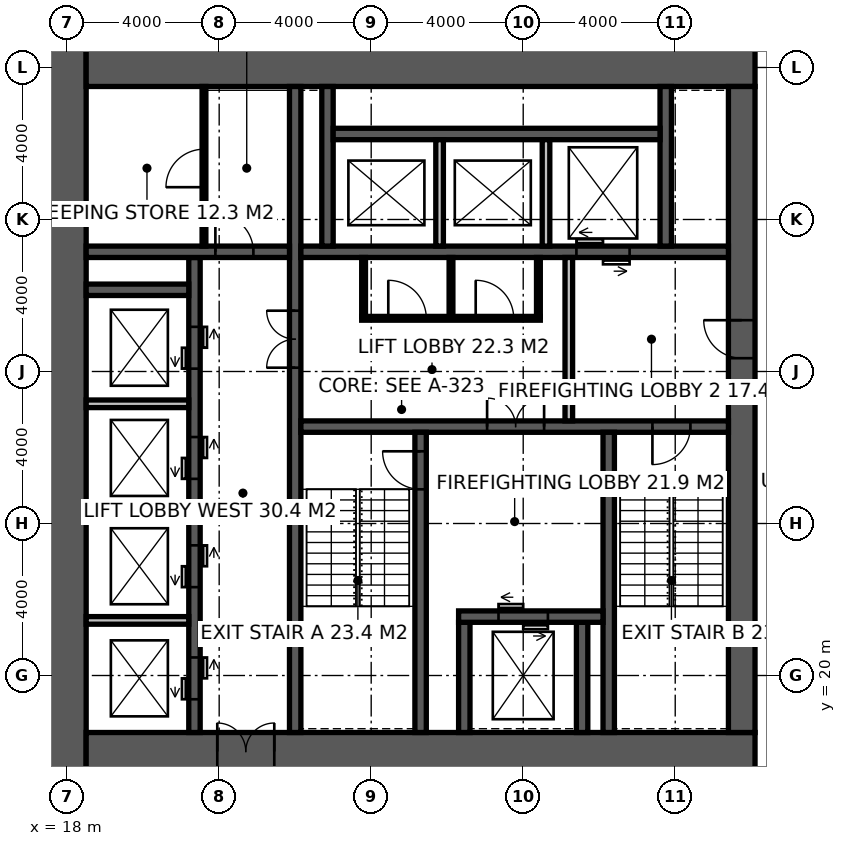
"""IFC4 building model, lengths in metres.
Left out: names, types, materials, properties, quantities, classifications, styles, units other than length and angle.
Written with IfcOpenShell. Run it as: python <this file> out.ifc"""

import sys

from ifc_helpers import new_model, si_unit, direction, frame, frame_2d, origin, place, context, subcontext, project, spatial, rectangle, extrude, element, fill, save


model = new_model("IFC4")
c1 = context("Model", 3, precision=1e-05, world=origin(), true_north=direction((0.0, 1.0)))
c2 = subcontext(c1, "Body", "Model", "MODEL_VIEW")
j1 = project(units=[si_unit("LENGTHUNIT", "METRE"), si_unit("PLANEANGLEUNIT", "RADIAN")], contexts=[c1])
p1 = place(None, origin())
s1 = spatial("IfcSite", under=j1, at=p1, CompositionType="ELEMENT")
p2 = place(p1, origin())
s2 = spatial("IfcBuilding", under=s1, at=p2, CompositionType="ELEMENT")
p3 = place(p2, frame((0.0, 0.0, 113.4)))
s3 = spatial("IfcBuildingStorey", under=s2, at=p3, CompositionType="ELEMENT", Elevation=113.4)
p4 = place(p3, frame((18.0, 17.5, -0.15), z_axis=(0.0, 0.0, 1.0), x_axis=(0.0, 1.0, 0.0)))
e1 = element("IfcWall", 1, at=p4, inside=s3, PredefinedType="SHEAR", context=c2, shape_type="SweptSolid", body=[
    extrude(rectangle(XDim=19.0, YDim=1.0, at=frame_2d((9.5, 0.0))), origin(), (0.0, 0.0, 1.0), 4.0),
])
p5 = place(p3, frame((18.5, 18.0, -0.15), z_axis=(0.0, 0.0, 1.0), x_axis=(1.0, 0.0, 0.0)))
e2 = element("IfcWall", 2, at=p5, inside=s3, PredefinedType="SHEAR", context=c2, shape_type="SweptSolid", body=[
    extrude(rectangle(XDim=17.6, YDim=1.0, at=frame_2d((8.8, 0.0))), origin(), (0.0, 0.0, 1.0), 4.0),
])
p6 = place(p5, frame((3.45, 0.0, 0.15)))
e3 = element("IfcOpeningElement", 3, at=p6, cuts=e2, PredefinedType="OPENING", context=c2, shape_type="SweptSolid", body=[
    extrude(rectangle(XDim=1.5, YDim=2.4, at=frame_2d((0.75, 1.2))), frame((0.0, 0.51, 0.0), z_axis=(0.0, -1.0, 0.0), x_axis=(1.0, 0.0, 0.0)), (0.0, 0.0, 1.0), 1.02),
])
p7 = place(p3, frame((18.5, 36.0, -0.15), z_axis=(0.0, 0.0, 1.0), x_axis=(1.0, 0.0, 0.0)))
e4 = element("IfcWall", 4, at=p7, inside=s3, PredefinedType="SHEAR", context=c2, shape_type="SweptSolid", body=[
    extrude(rectangle(XDim=17.6, YDim=1.0, at=frame_2d((8.8, 0.0))), origin(), (0.0, 0.0, 1.0), 4.0),
])
p8 = place(p3, frame((35.75, 18.5, -0.15), z_axis=(0.0, 0.0, 1.0), x_axis=(0.0, 1.0, 0.0)))
e5 = element("IfcWall", 5, at=p8, inside=s3, PredefinedType="SHEAR", context=c2, shape_type="SweptSolid", body=[
    extrude(rectangle(XDim=17.0, YDim=0.7, at=frame_2d((8.5, 0.0))), origin(), (0.0, 0.0, 1.0), 4.0),
])
p9 = place(p8, frame((9.85, 0.0, 0.15)))
e6 = element("IfcOpeningElement", 6, at=p9, cuts=e5, PredefinedType="OPENING", context=c2, shape_type="SweptSolid", body=[
    extrude(rectangle(XDim=1.0, YDim=2.2, at=frame_2d((0.5, 1.1))), frame((0.0, 0.36, 0.0), z_axis=(0.0, -1.0, 0.0), x_axis=(1.0, 0.0, 0.0)), (0.0, 0.0, 1.0), 0.72),
])
p10 = place(p3, frame((24.0, 18.5, -0.15), z_axis=(0.0, 0.0, 1.0), x_axis=(0.0, 1.0, 0.0)))
e7 = element("IfcWall", 7, at=p10, inside=s3, PredefinedType="SHEAR", context=c2, shape_type="SweptSolid", body=[
    extrude(rectangle(XDim=17.0, YDim=0.3, at=frame_2d((8.5, 0.0))), origin(), (0.0, 0.0, 1.0), 4.0),
])
p11 = place(p10, frame((9.6, 0.0, 0.15)))
e8 = element("IfcOpeningElement", 8, at=p11, cuts=e7, PredefinedType="OPENING", context=c2, shape_type="SweptSolid", body=[
    extrude(rectangle(XDim=1.5, YDim=2.4, at=frame_2d((0.75, 1.2))), frame((0.0, 0.16, 0.0), z_axis=(0.0, -1.0, 0.0), x_axis=(1.0, 0.0, 0.0)), (0.0, 0.0, 1.0), 0.32),
])
p12 = place(p3, frame((24.15, 26.55, -0.15), z_axis=(0.0, 0.0, 1.0), x_axis=(1.0, 0.0, 0.0)))
e9 = element("IfcWall", 9, at=p12, inside=s3, PredefinedType="SHEAR", context=c2, shape_type="SweptSolid", body=[
    extrude(rectangle(XDim=11.25, YDim=0.3, at=frame_2d((5.625, 0.0))), origin(), (0.0, 0.0, 1.0), 4.0),
])
p13 = place(p12, frame((9.25, 0.0, 0.15)))
e10 = element("IfcOpeningElement", 10, at=p13, cuts=e9, PredefinedType="OPENING", context=c2, shape_type="SweptSolid", body=[
    extrude(rectangle(XDim=1.0, YDim=2.2, at=frame_2d((0.5, 1.1))), frame((0.0, 0.16, 0.0), z_axis=(0.0, -1.0, 0.0), x_axis=(1.0, 0.0, 0.0)), (0.0, 0.0, 1.0), 0.32),
])
p14 = place(p12, frame((4.9, 0.0, 0.15)))
e11 = element("IfcOpeningElement", 11, at=p14, cuts=e9, PredefinedType="OPENING", context=c2, shape_type="SweptSolid", body=[
    extrude(rectangle(XDim=1.5, YDim=2.4, at=frame_2d((0.75, 1.2))), frame((0.0, 0.16, 0.0), z_axis=(0.0, -1.0, 0.0), x_axis=(1.0, 0.0, 0.0)), (0.0, 0.0, 1.0), 0.32),
])
p15 = place(p3, frame((27.3, 18.5, -0.15), z_axis=(0.0, 0.0, 1.0), x_axis=(0.0, 1.0, 0.0)))
e12 = element("IfcWall", 12, at=p15, inside=s3, PredefinedType="SHEAR", context=c2, shape_type="SweptSolid", body=[
    extrude(rectangle(XDim=7.9, YDim=0.3, at=frame_2d((3.95, 0.0))), origin(), (0.0, 0.0, 1.0), 4.0),
])
p16 = place(p15, frame((6.4, 0.0, 0.15)))
e13 = element("IfcOpeningElement", 13, at=p16, cuts=e12, PredefinedType="OPENING", context=c2, shape_type="SweptSolid", body=[
    extrude(rectangle(XDim=1.0, YDim=2.2, at=frame_2d((0.5, 1.1))), frame((0.0, 0.16, 0.0), z_axis=(0.0, -1.0, 0.0), x_axis=(1.0, 0.0, 0.0)), (0.0, 0.0, 1.0), 0.32),
])
p17 = place(p3, frame((32.25, 18.5, -0.15), z_axis=(0.0, 0.0, 1.0), x_axis=(0.0, 1.0, 0.0)))
e14 = element("IfcWall", 14, at=p17, inside=s3, PredefinedType="SHEAR", context=c2, shape_type="SweptSolid", body=[
    extrude(rectangle(XDim=7.9, YDim=0.3, at=frame_2d((3.95, 0.0))), origin(), (0.0, 0.0, 1.0), 4.0),
])
for number, where, z_axis, x_axis in (
    (15, (28.45, 18.5, -0.15), (0.0, 0.0, 1.0), (0.0, 1.0, 0.0)),
    (16, (31.55, 18.5, -0.15), (0.0, 0.0, 1.0), (0.0, 1.0, 0.0)),
):
    element("IfcWall", number, at=place(p3, frame(where, z_axis=z_axis, x_axis=x_axis)), inside=s3, PredefinedType="SHEAR", context=c2, shape_type="SweptSolid", body=[
        extrude(rectangle(XDim=2.9, YDim=0.3, at=frame_2d((1.45, 0.0))), origin(), (0.0, 0.0, 1.0), 4.0),
    ])
p18 = place(p3, frame((28.3, 21.55, -0.15), z_axis=(0.0, 0.0, 1.0), x_axis=(1.0, 0.0, 0.0)))
e17 = element("IfcWall", 17, at=p18, inside=s3, PredefinedType="SHEAR", context=c2, shape_type="SweptSolid", body=[
    extrude(rectangle(XDim=3.8, YDim=0.3, at=frame_2d((1.9, 0.0))), origin(), (0.0, 0.0, 1.0), 4.0),
])
p19 = place(p18, frame((1.05, 0.0, 0.15)))
e18 = element("IfcOpeningElement", 18, at=p19, cuts=e17, PredefinedType="OPENING", context=c2, shape_type="SweptSolid", body=[
    extrude(rectangle(XDim=1.3, YDim=2.4, at=frame_2d((0.65, 1.2))), frame((0.0, 0.16, 0.0), z_axis=(0.0, -1.0, 0.0), x_axis=(1.0, 0.0, 0.0)), (0.0, 0.0, 1.0), 0.32),
])
p20 = place(p3, frame((24.15, 31.15, -0.15), z_axis=(0.0, 0.0, 1.0), x_axis=(1.0, 0.0, 0.0)))
e19 = element("IfcWall", 19, at=p20, inside=s3, PredefinedType="SHEAR", context=c2, shape_type="SweptSolid", body=[
    extrude(rectangle(XDim=11.25, YDim=0.3, at=frame_2d((5.625, 0.0))), origin(), (0.0, 0.0, 1.0), 4.0),
])
p21 = place(p20, frame((7.25, 0.0, 0.15)))
e20 = element("IfcOpeningElement", 20, at=p21, cuts=e19, PredefinedType="OPENING", context=c2, shape_type="SweptSolid", body=[
    extrude(rectangle(XDim=1.4, YDim=2.4, at=frame_2d((0.7, 1.2))), frame((0.0, 0.16, 0.0), z_axis=(0.0, -1.0, 0.0), x_axis=(1.0, 0.0, 0.0)), (0.0, 0.0, 1.0), 0.32),
])
p22 = place(p3, frame((21.35, 18.5, -0.15), z_axis=(0.0, 0.0, 1.0), x_axis=(0.0, 1.0, 0.0)))
e21 = element("IfcWall", 21, at=p22, inside=s3, PredefinedType="SHEAR", context=c2, shape_type="SweptSolid", body=[
    extrude(rectangle(XDim=12.5, YDim=0.3, at=frame_2d((6.25, 0.0))), origin(), (0.0, 0.0, 1.0), 4.0),
])
p23 = place(p22, frame((0.875, 0.0, 0.15)))
e22 = element("IfcOpeningElement", 22, at=p23, cuts=e21, PredefinedType="OPENING", context=c2, shape_type="SweptSolid", body=[
    extrude(rectangle(XDim=1.1, YDim=2.2, at=frame_2d((0.55, 1.1))), frame((0.0, 0.16, 0.0), z_axis=(0.0, -1.0, 0.0), x_axis=(1.0, 0.0, 0.0)), (0.0, 0.0, 1.0), 0.32),
])
p24 = place(p22, frame((3.825, 0.0, 0.15)))
e23 = element("IfcOpeningElement", 23, at=p24, cuts=e21, PredefinedType="OPENING", context=c2, shape_type="SweptSolid", body=[
    extrude(rectangle(XDim=1.1, YDim=2.2, at=frame_2d((0.55, 1.1))), frame((0.0, 0.16, 0.0), z_axis=(0.0, -1.0, 0.0), x_axis=(1.0, 0.0, 0.0)), (0.0, 0.0, 1.0), 0.32),
])
p25 = place(p22, frame((6.675, 0.0, 0.15)))
e24 = element("IfcOpeningElement", 24, at=p25, cuts=e21, PredefinedType="OPENING", context=c2, shape_type="SweptSolid", body=[
    extrude(rectangle(XDim=1.1, YDim=2.2, at=frame_2d((0.55, 1.1))), frame((0.0, 0.16, 0.0), z_axis=(0.0, -1.0, 0.0), x_axis=(1.0, 0.0, 0.0)), (0.0, 0.0, 1.0), 0.32),
])
p26 = place(p22, frame((9.575, 0.0, 0.15)))
e25 = element("IfcOpeningElement", 25, at=p26, cuts=e21, PredefinedType="OPENING", context=c2, shape_type="SweptSolid", body=[
    extrude(rectangle(XDim=1.1, YDim=2.2, at=frame_2d((0.55, 1.1))), frame((0.0, 0.16, 0.0), z_axis=(0.0, -1.0, 0.0), x_axis=(1.0, 0.0, 0.0)), (0.0, 0.0, 1.0), 0.32),
])
p27 = place(p3, frame((18.5, 31.15, -0.15), z_axis=(0.0, 0.0, 1.0), x_axis=(1.0, 0.0, 0.0)))
e26 = element("IfcWall", 26, at=p27, inside=s3, PredefinedType="SHEAR", context=c2, shape_type="SweptSolid", body=[
    extrude(rectangle(XDim=5.35, YDim=0.3, at=frame_2d((2.675, 0.0))), origin(), (0.0, 0.0, 1.0), 4.0),
])
p28 = place(p27, frame((3.4, 0.0, 0.15)))
e27 = element("IfcOpeningElement", 27, at=p28, cuts=e26, PredefinedType="OPENING", context=c2, shape_type="SweptSolid", body=[
    extrude(rectangle(XDim=1.0, YDim=2.2, at=frame_2d((0.5, 1.1))), frame((0.0, 0.16, 0.0), z_axis=(0.0, -1.0, 0.0), x_axis=(1.0, 0.0, 0.0)), (0.0, 0.0, 1.0), 0.32),
])
p29 = place(p3, frame((18.5, 30.15, -0.15), z_axis=(0.0, 0.0, 1.0), x_axis=(1.0, 0.0, 0.0)))
e28 = element("IfcWall", 28, at=p29, inside=s3, PredefinedType="SHEAR", context=c2, shape_type="SweptSolid", body=[
    extrude(rectangle(XDim=2.7, YDim=0.3, at=frame_2d((1.35, 0.0))), origin(), (0.0, 0.0, 1.0), 4.0),
])
for number, where, z_axis, x_axis in (
    (29, (24.85, 31.3, -0.15), (0.0, 0.0, 1.0), (0.0, 1.0, 0.0)),
    (30, (33.75, 31.3, -0.15), (0.0, 0.0, 1.0), (0.0, 1.0, 0.0)),
):
    element("IfcWall", number, at=place(p3, frame(where, z_axis=z_axis, x_axis=x_axis)), inside=s3, PredefinedType="SHEAR", context=c2, shape_type="SweptSolid", body=[
        extrude(rectangle(XDim=4.2, YDim=0.3, at=frame_2d((2.1, 0.0))), origin(), (0.0, 0.0, 1.0), 4.0),
    ])
p30 = place(p3, frame((25.0, 34.25, -0.15), z_axis=(0.0, 0.0, 1.0), x_axis=(1.0, 0.0, 0.0)))
e31 = element("IfcWall", 31, at=p30, inside=s3, PredefinedType="SHEAR", context=c2, shape_type="SweptSolid", body=[
    extrude(rectangle(XDim=8.6, YDim=0.3, at=frame_2d((4.3, 0.0))), origin(), (0.0, 0.0, 1.0), 4.0),
])
for number, where, z_axis, x_axis in (
    (32, (27.8, 31.3, -0.15), (0.0, 0.0, 1.0), (0.0, 1.0, 0.0)),
    (33, (30.6, 31.3, -0.15), (0.0, 0.0, 1.0), (0.0, 1.0, 0.0)),
):
    element("IfcWall", number, at=place(p3, frame(where, z_axis=z_axis, x_axis=x_axis)), inside=s3, PredefinedType="SOLIDWALL", context=c2, shape_type="SweptSolid", body=[
        extrude(rectangle(XDim=2.8, YDim=0.2, at=frame_2d((1.4, 0.0))), origin(), (0.0, 0.0, 1.0), 4.0),
    ])
for number, where, z_axis, x_axis in (
    (34, (18.5, 21.45, -0.15), (0.0, 0.0, 1.0), (1.0, 0.0, 0.0)),
    (35, (18.5, 24.3, -0.15), (0.0, 0.0, 1.0), (1.0, 0.0, 0.0)),
    (36, (18.5, 27.15, -0.15), (0.0, 0.0, 1.0), (1.0, 0.0, 0.0)),
):
    element("IfcWall", number, at=place(p3, frame(where, z_axis=z_axis, x_axis=x_axis)), inside=s3, PredefinedType="SOLIDWALL", context=c2, shape_type="SweptSolid", body=[
        extrude(rectangle(XDim=2.7, YDim=0.2, at=frame_2d((1.35, 0.0))), origin(), (0.0, 0.0, 1.0), 4.0),
    ])
p31 = place(p3, frame((31.2, 26.7, 0.0), z_axis=(0.0, 0.0, 1.0), x_axis=(0.0, 1.0, 0.0)))
e37 = element("IfcWall", 37, at=p31, inside=s3, PredefinedType="SOLIDWALL", context=c2, shape_type="SweptSolid", body=[
    extrude(rectangle(XDim=4.3, YDim=0.2, at=frame_2d((2.15, 0.0))), origin(), (0.0, 0.0, 1.0), 3.85),
])
p32 = place(p3, frame((21.6, 31.3, 0.0), z_axis=(0.0, 0.0, 1.0), x_axis=(0.0, 1.0, 0.0)))
e38 = element("IfcWall", 38, at=p32, inside=s3, PredefinedType="PARTITIONING", context=c2, shape_type="SweptSolid", body=[
    extrude(rectangle(XDim=4.2, YDim=0.1, at=frame_2d((2.1, 0.0))), origin(), (0.0, 0.0, 1.0), 3.85),
])
p33 = place(p32, frame((1.55, 0.0, 0.0)))
e39 = element("IfcOpeningElement", 39, at=p33, cuts=e38, PredefinedType="OPENING", context=c2, shape_type="SweptSolid", body=[
    extrude(rectangle(XDim=1.0, YDim=2.2, at=frame_2d((0.5, 1.1))), frame((0.0, 0.06, 0.0), z_axis=(0.0, -1.0, 0.0), x_axis=(1.0, 0.0, 0.0)), (0.0, 0.0, 1.0), 0.12),
])
p34 = place(p3, frame((25.75, 29.4, 0.0), z_axis=(0.0, 0.0, 1.0), x_axis=(1.0, 0.0, 0.0)))
e40 = element("IfcWall", 40, at=p34, inside=s3, PredefinedType="PARTITIONING", context=c2, shape_type="SweptSolid", body=[
    extrude(rectangle(XDim=4.7, YDim=0.1, at=frame_2d((2.35, 0.0))), origin(), (0.0, 0.0, 1.0), 3.85),
])
p35 = place(p34, frame((0.7, 0.0, 0.0)))
e41 = element("IfcOpeningElement", 41, at=p35, cuts=e40, PredefinedType="OPENING", context=c2, shape_type="SweptSolid", body=[
    extrude(rectangle(XDim=1.0, YDim=2.2, at=frame_2d((0.5, 1.1))), frame((0.0, 0.06, 0.0), z_axis=(0.0, -1.0, 0.0), x_axis=(1.0, 0.0, 0.0)), (0.0, 0.0, 1.0), 0.12),
])
p36 = place(p34, frame((3.0, 0.0, 0.0)))
e42 = element("IfcOpeningElement", 42, at=p36, cuts=e40, PredefinedType="OPENING", context=c2, shape_type="SweptSolid", body=[
    extrude(rectangle(XDim=1.0, YDim=2.2, at=frame_2d((0.5, 1.1))), frame((0.0, 0.06, 0.0), z_axis=(0.0, -1.0, 0.0), x_axis=(1.0, 0.0, 0.0)), (0.0, 0.0, 1.0), 0.12),
])
for number, where, z_axis, x_axis in (
    (43, (25.8, 29.45, 0.0), (0.0, 0.0, 1.0), (0.0, 1.0, 0.0)),
    (44, (30.4, 29.45, 0.0), (0.0, 0.0, 1.0), (0.0, 1.0, 0.0)),
    (45, (28.1, 29.45, 0.0), (0.0, 0.0, 1.0), (0.0, 1.0, 0.0)),
):
    element("IfcWall", number, at=place(p3, frame(where, z_axis=z_axis, x_axis=x_axis)), inside=s3, PredefinedType="PARTITIONING", context=c2, shape_type="SweptSolid", body=[
        extrude(rectangle(XDim=1.55, YDim=0.1, at=frame_2d((0.775, 0.0))), origin(), (0.0, 0.0, 1.0), 3.85),
    ])
p37 = place(p16, origin())
e46 = element("IfcDoor", 46, at=p37, inside=s3, OperationType="SINGLE_SWING_RIGHT", PredefinedType="DOOR", context=c2, shape_type="SweptSolid", body=[
    extrude(rectangle(XDim=1.0, YDim=2.2, at=frame_2d((0.5, 1.1))), frame((0.0, 0.025, 0.0), z_axis=(0.0, -1.0, 0.0), x_axis=(1.0, 0.0, 0.0)), (0.0, 0.0, 1.0), 0.05),
])
fill(e13, e46)
p38 = place(p13, frame((1.0, 0.0, 0.0), z_axis=(0.0, 0.0, 1.0), x_axis=(-1.0, 0.0, 0.0)))
e47 = element("IfcDoor", 47, at=p38, inside=s3, OperationType="SINGLE_SWING_RIGHT", PredefinedType="DOOR", context=c2, shape_type="SweptSolid", body=[
    extrude(rectangle(XDim=1.0, YDim=2.2, at=frame_2d((0.5, 1.1))), frame((0.0, 0.025, 0.0), z_axis=(0.0, -1.0, 0.0), x_axis=(1.0, 0.0, 0.0)), (0.0, 0.0, 1.0), 0.05),
])
fill(e10, e47)
p39 = place(p9, origin())
e48 = element("IfcDoor", 48, at=p39, inside=s3, OperationType="SINGLE_SWING_RIGHT", PredefinedType="DOOR", context=c2, shape_type="SweptSolid", body=[
    extrude(rectangle(XDim=1.0, YDim=2.2, at=frame_2d((0.5, 1.1))), frame((0.0, 0.025, 0.0), z_axis=(0.0, -1.0, 0.0), x_axis=(1.0, 0.0, 0.0)), (0.0, 0.0, 1.0), 0.05),
])
fill(e6, e48)
p40 = place(p14, origin())
e49 = element("IfcDoor", 49, at=p40, inside=s3, OperationType="DOUBLE_DOOR_DOUBLE_SWING", PredefinedType="DOOR", context=c2, shape_type="SweptSolid", body=[
    extrude(rectangle(XDim=1.5, YDim=2.4, at=frame_2d((0.75, 1.2))), frame((0.0, 0.025, 0.0), z_axis=(0.0, -1.0, 0.0), x_axis=(1.0, 0.0, 0.0)), (0.0, 0.0, 1.0), 0.05),
])
fill(e11, e49)
p41 = place(p11, origin())
e50 = element("IfcDoor", 50, at=p41, inside=s3, OperationType="DOUBLE_DOOR_DOUBLE_SWING", PredefinedType="DOOR", context=c2, shape_type="SweptSolid", body=[
    extrude(rectangle(XDim=1.5, YDim=2.4, at=frame_2d((0.75, 1.2))), frame((0.0, 0.025, 0.0), z_axis=(0.0, -1.0, 0.0), x_axis=(1.0, 0.0, 0.0)), (0.0, 0.0, 1.0), 0.05),
])
fill(e8, e50)
p42 = place(p28, origin())
e51 = element("IfcDoor", 51, at=p42, inside=s3, OperationType="SINGLE_SWING_LEFT", PredefinedType="DOOR", context=c2, shape_type="SweptSolid", body=[
    extrude(rectangle(XDim=1.0, YDim=2.2, at=frame_2d((0.5, 1.1))), frame((0.0, 0.025, 0.0), z_axis=(0.0, -1.0, 0.0), x_axis=(1.0, 0.0, 0.0)), (0.0, 0.0, 1.0), 0.05),
])
fill(e27, e51)
p43 = place(p33, origin())
e52 = element("IfcDoor", 52, at=p43, inside=s3, OperationType="SINGLE_SWING_LEFT", PredefinedType="DOOR", context=c2, shape_type="SweptSolid", body=[
    extrude(rectangle(XDim=1.0, YDim=2.2, at=frame_2d((0.5, 1.1))), frame((0.0, 0.025, 0.0), z_axis=(0.0, -1.0, 0.0), x_axis=(1.0, 0.0, 0.0)), (0.0, 0.0, 1.0), 0.05),
])
fill(e39, e52)
p44 = place(p35, origin())
e53 = element("IfcDoor", 53, at=p44, inside=s3, OperationType="SINGLE_SWING_LEFT", PredefinedType="DOOR", context=c2, shape_type="SweptSolid", body=[
    extrude(rectangle(XDim=1.0, YDim=2.2, at=frame_2d((0.5, 1.1))), frame((0.0, 0.025, 0.0), z_axis=(0.0, -1.0, 0.0), x_axis=(1.0, 0.0, 0.0)), (0.0, 0.0, 1.0), 0.05),
])
fill(e41, e53)
p45 = place(p36, origin())
e54 = element("IfcDoor", 54, at=p45, inside=s3, OperationType="SINGLE_SWING_LEFT", PredefinedType="DOOR", context=c2, shape_type="SweptSolid", body=[
    extrude(rectangle(XDim=1.0, YDim=2.2, at=frame_2d((0.5, 1.1))), frame((0.0, 0.025, 0.0), z_axis=(0.0, -1.0, 0.0), x_axis=(1.0, 0.0, 0.0)), (0.0, 0.0, 1.0), 0.05),
])
fill(e42, e54)
p46 = place(p6, origin())
e55 = element("IfcDoor", 55, at=p46, inside=s3, OperationType="DOUBLE_DOOR_DOUBLE_SWING", PredefinedType="DOOR", context=c2, shape_type="SweptSolid", body=[
    extrude(rectangle(XDim=1.5, YDim=2.4, at=frame_2d((0.75, 1.2))), frame((0.0, 0.025, 0.0), z_axis=(0.0, -1.0, 0.0), x_axis=(1.0, 0.0, 0.0)), (0.0, 0.0, 1.0), 0.05),
])
fill(e3, e55)
p47 = place(p19, origin())
e56 = element("IfcDoor", 56, at=p47, inside=s3, OperationType="DOUBLE_DOOR_SLIDING", PredefinedType="DOOR", context=c2, shape_type="SweptSolid", body=[
    extrude(rectangle(XDim=1.3, YDim=2.4, at=frame_2d((0.65, 1.2))), frame((0.0, 0.025, 0.0), z_axis=(0.0, -1.0, 0.0), x_axis=(1.0, 0.0, 0.0)), (0.0, 0.0, 1.0), 0.05),
])
fill(e18, e56)
p48 = place(p21, origin())
e57 = element("IfcDoor", 57, at=p48, inside=s3, OperationType="DOUBLE_DOOR_SLIDING", PredefinedType="DOOR", context=c2, shape_type="SweptSolid", body=[
    extrude(rectangle(XDim=1.4, YDim=2.4, at=frame_2d((0.7, 1.2))), frame((0.0, 0.025, 0.0), z_axis=(0.0, -1.0, 0.0), x_axis=(1.0, 0.0, 0.0)), (0.0, 0.0, 1.0), 0.05),
])
fill(e20, e57)
p49 = place(p23, origin())
e58 = element("IfcDoor", 58, at=p49, inside=s3, OperationType="DOUBLE_DOOR_SLIDING", PredefinedType="DOOR", context=c2, shape_type="SweptSolid", body=[
    extrude(rectangle(XDim=1.1, YDim=2.2, at=frame_2d((0.55, 1.1))), frame((0.0, 0.025, 0.0), z_axis=(0.0, -1.0, 0.0), x_axis=(1.0, 0.0, 0.0)), (0.0, 0.0, 1.0), 0.05),
])
fill(e22, e58)
p50 = place(p24, origin())
e59 = element("IfcDoor", 59, at=p50, inside=s3, OperationType="DOUBLE_DOOR_SLIDING", PredefinedType="DOOR", context=c2, shape_type="SweptSolid", body=[
    extrude(rectangle(XDim=1.1, YDim=2.2, at=frame_2d((0.55, 1.1))), frame((0.0, 0.025, 0.0), z_axis=(0.0, -1.0, 0.0), x_axis=(1.0, 0.0, 0.0)), (0.0, 0.0, 1.0), 0.05),
])
fill(e23, e59)
p51 = place(p25, origin())
e60 = element("IfcDoor", 60, at=p51, inside=s3, OperationType="DOUBLE_DOOR_SLIDING", PredefinedType="DOOR", context=c2, shape_type="SweptSolid", body=[
    extrude(rectangle(XDim=1.1, YDim=2.2, at=frame_2d((0.55, 1.1))), frame((0.0, 0.025, 0.0), z_axis=(0.0, -1.0, 0.0), x_axis=(1.0, 0.0, 0.0)), (0.0, 0.0, 1.0), 0.05),
])
fill(e24, e60)
p52 = place(p26, origin())
e61 = element("IfcDoor", 61, at=p52, inside=s3, OperationType="DOUBLE_DOOR_SLIDING", PredefinedType="DOOR", context=c2, shape_type="SweptSolid", body=[
    extrude(rectangle(XDim=1.1, YDim=2.2, at=frame_2d((0.55, 1.1))), frame((0.0, 0.025, 0.0), z_axis=(0.0, -1.0, 0.0), x_axis=(1.0, 0.0, 0.0)), (0.0, 0.0, 1.0), 0.05),
])
fill(e25, e61)
save(model, sys.argv[1])
